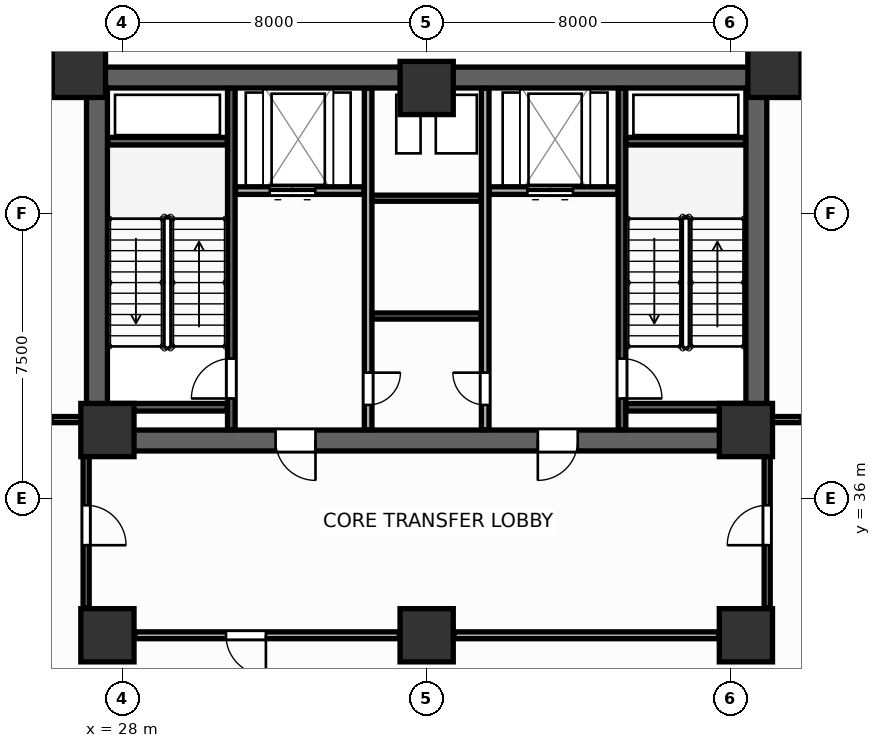
"""IFC4 building model, lengths in metres.
Left out: names, types, materials, properties, quantities, classifications, styles, units other than length and angle.
Written with IfcOpenShell. Run it as: python <this file> out.ifc"""

import sys

from ifc_helpers import new_model, si_unit, direction, frame, frame_2d, origin, origin_2d, place, context, subcontext, project, spatial, rectangle, extrude, source, transform, mapped, element, fill, save


model = new_model("IFC4")
c1 = context("Model", 3, precision=1e-05, world=origin(), true_north=direction((0.0, 1.0)))
c2 = subcontext(c1, "Body", "Model", "MODEL_VIEW")
j1 = project(units=[si_unit("LENGTHUNIT", "METRE"), si_unit("PLANEANGLEUNIT", "RADIAN")], contexts=[c1])
p1 = place(None, origin())
s1 = spatial("IfcSite", under=j1, at=p1, CompositionType="ELEMENT")
p2 = place(p1, origin())
s2 = spatial("IfcBuilding", under=s1, at=p2, CompositionType="ELEMENT")
p3 = place(p2, frame((0.0, 0.0, -4.5)))
s3 = spatial("IfcBuildingStorey", under=s2, at=p3, CompositionType="ELEMENT", Elevation=-4.5)
p4 = place(p3, frame((27.05, 47.075, 0.0), z_axis=(0.0, 0.0, 1.0), x_axis=(1.0, 0.0, 0.0)))
e1 = element("IfcWall", 1, at=p4, inside=s3, PredefinedType="SHEAR", context=c2, shape_type="SweptSolid", body=[
    extrude(rectangle(XDim=17.9, YDim=0.55, at=frame_2d((8.95, 0.0))), origin(), (0.0, 0.0, 1.0), 4.5),
])
p5 = place(p3, frame((27.05, 37.525, 0.0), z_axis=(0.0, 0.0, 1.0), x_axis=(1.0, 0.0, 0.0)))
e2 = element("IfcWall", 2, at=p5, inside=s3, PredefinedType="SHEAR", context=c2, shape_type="SweptSolid", body=[
    extrude(rectangle(XDim=17.9, YDim=0.55, at=frame_2d((8.95, 0.0))), origin(), (0.0, 0.0, 1.0), 4.5),
])
p6 = place(p5, frame((4.975, 0.0, 0.0)))
e3 = element("IfcOpeningElement", 3, at=p6, cuts=e2, PredefinedType="OPENING", context=c2, shape_type="SweptSolid", body=[
    extrude(rectangle(XDim=1.05, YDim=2.1, at=frame_2d((0.525, 1.05))), frame((0.0, 0.285, 0.0), z_axis=(0.0, -1.0, 0.0), x_axis=(1.0, 0.0, 0.0)), (0.0, 0.0, 1.0), 0.57),
])
p7 = place(p5, frame((11.875, 0.0, 0.0)))
e4 = element("IfcOpeningElement", 4, at=p7, cuts=e2, PredefinedType="OPENING", context=c2, shape_type="SweptSolid", body=[
    extrude(rectangle(XDim=1.05, YDim=2.1, at=frame_2d((0.525, 1.05))), frame((0.0, 0.285, 0.0), z_axis=(0.0, -1.0, 0.0), x_axis=(1.0, 0.0, 0.0)), (0.0, 0.0, 1.0), 0.57),
])
for number, where, z_axis, x_axis in (
    (5, (27.325, 37.8, 0.0), (0.0, 0.0, 1.0), (0.0, 1.0, 0.0)),
    (6, (44.675, 37.8, 0.0), (0.0, 0.0, 1.0), (0.0, 1.0, 0.0)),
):
    element("IfcWall", number, at=place(p3, frame(where, z_axis=z_axis, x_axis=x_axis)), inside=s3, PredefinedType="SHEAR", context=c2, shape_type="SweptSolid", body=[
        extrude(rectangle(XDim=9.0, YDim=0.55, at=frame_2d((4.5, 0.0))), origin(), (0.0, 0.0, 1.0), 4.5),
    ])
m1 = source(origin(), c2, "Body", "SweptSolid", [
    extrude(rectangle(XDim=1.4, YDim=1.4, at=origin_2d()), origin(), (0.0, 0.0, 1.0), 4.5),
])
for number, where, z_axis, x_axis in (
    (7, (26.85, 47.25, 0.0), (0.0, 0.0, 1.0), (1.0, 0.0, 0.0)),
    (8, (45.15, 47.25, 0.0), (0.0, 0.0, 1.0), (1.0, 0.0, 0.0)),
    (9, (27.6, 37.8, 0.0), (0.0, 0.0, 1.0), (1.0, 0.0, 0.0)),
    (10, (44.4, 37.8, 0.0), (0.0, 0.0, 1.0), (1.0, 0.0, 0.0)),
    (11, (27.6, 32.4, 0.0), (0.0, 0.0, 1.0), (1.0, 0.0, 0.0)),
    (12, (44.4, 32.4, 0.0), (0.0, 0.0, 1.0), (1.0, 0.0, 0.0)),
    (13, (36.0, 46.8, 0.0), (0.0, 0.0, 1.0), (1.0, 0.0, 0.0)),
    (14, (36.0, 32.4, 0.0), (0.0, 0.0, 1.0), (1.0, 0.0, 0.0)),
):
    element("IfcColumn", number, at=place(p3, frame(where, z_axis=z_axis, x_axis=x_axis)), inside=s3, PredefinedType="COLUMN", context=c2, shape_type="MappedRepresentation", body=[
        mapped(m1, transform((0.0, 0.0, 0.0), scale=1.0)),
    ])
p8 = place(p3, frame((30.86, 37.81, 0.0), z_axis=(0.0, 0.0, 1.0), x_axis=(0.0, 1.0, 0.0)))
e15 = element("IfcWall", 15, at=p8, inside=s3, PredefinedType="SHEAR", context=c2, shape_type="SweptSolid", body=[
    extrude(rectangle(XDim=8.98, YDim=0.2, at=frame_2d((4.49, 0.0))), origin(), (0.0, 0.0, 1.0), 4.5),
])
p9 = place(p8, frame((0.82, 0.0, 0.0)))
e16 = element("IfcOpeningElement", 16, at=p9, cuts=e15, PredefinedType="OPENING", context=c2, shape_type="SweptSolid", body=[
    extrude(rectangle(XDim=1.05, YDim=2.1, at=frame_2d((0.525, 1.05))), frame((0.0, 0.11, 0.0), z_axis=(0.0, -1.0, 0.0), x_axis=(1.0, 0.0, 0.0)), (0.0, 0.0, 1.0), 0.22),
])
for number, where, z_axis, x_axis in (
    (17, (27.61, 45.4, 0.0), (0.0, 0.0, 1.0), (1.0, 0.0, 0.0)),
    (18, (27.61, 38.4, 0.0), (0.0, 0.0, 1.0), (1.0, 0.0, 0.0)),
):
    element("IfcWall", number, at=place(p3, frame(where, z_axis=z_axis, x_axis=x_axis)), inside=s3, PredefinedType="SHEAR", context=c2, shape_type="SweptSolid", body=[
        extrude(rectangle(XDim=3.14, YDim=0.2, at=frame_2d((1.57, 0.0))), origin(), (0.0, 0.0, 1.0), 4.5),
    ])
p10 = place(p3, frame((41.14, 37.81, 0.0), z_axis=(0.0, 0.0, 1.0), x_axis=(0.0, 1.0, 0.0)))
e19 = element("IfcWall", 19, at=p10, inside=s3, PredefinedType="SHEAR", context=c2, shape_type="SweptSolid", body=[
    extrude(rectangle(XDim=8.98, YDim=0.2, at=frame_2d((4.49, 0.0))), origin(), (0.0, 0.0, 1.0), 4.5),
])
p11 = place(p10, frame((0.82, 0.0, 0.0)))
e20 = element("IfcOpeningElement", 20, at=p11, cuts=e19, PredefinedType="OPENING", context=c2, shape_type="SweptSolid", body=[
    extrude(rectangle(XDim=1.05, YDim=2.1, at=frame_2d((0.525, 1.05))), frame((0.0, 0.11, 0.0), z_axis=(0.0, -1.0, 0.0), x_axis=(1.0, 0.0, 0.0)), (0.0, 0.0, 1.0), 0.22),
])
for number, where, z_axis, x_axis in (
    (21, (41.25, 45.4, 0.0), (0.0, 0.0, 1.0), (1.0, 0.0, 0.0)),
    (22, (41.25, 38.4, 0.0), (0.0, 0.0, 1.0), (1.0, 0.0, 0.0)),
):
    element("IfcWall", number, at=place(p3, frame(where, z_axis=z_axis, x_axis=x_axis)), inside=s3, PredefinedType="SHEAR", context=c2, shape_type="SweptSolid", body=[
        extrude(rectangle(XDim=3.14, YDim=0.2, at=frame_2d((1.57, 0.0))), origin(), (0.0, 0.0, 1.0), 4.5),
    ])
p12 = place(p3, frame((30.97, 44.1, 0.0), z_axis=(0.0, 0.0, 1.0), x_axis=(1.0, 0.0, 0.0)))
e23 = element("IfcWall", 23, at=p12, inside=s3, PredefinedType="PARTITIONING", context=c2, shape_type="SweptSolid", body=[
    extrude(rectangle(XDim=3.38, YDim=0.2, at=frame_2d((1.69, 0.0))), origin(), (0.0, 0.0, 1.0), 4.22),
])
p13 = place(p12, frame((0.9, 0.0, 0.0)))
e24 = element("IfcOpeningElement", 24, at=p13, cuts=e23, PredefinedType="OPENING", context=c2, shape_type="SweptSolid", body=[
    extrude(rectangle(XDim=1.2, YDim=2.1, at=frame_2d((0.6, 1.05))), frame((0.0, 0.11, 0.0), z_axis=(0.0, -1.0, 0.0), x_axis=(1.0, 0.0, 0.0)), (0.0, 0.0, 1.0), 0.22),
])
p14 = place(p3, frame((37.65, 44.1, 0.0), z_axis=(0.0, 0.0, 1.0), x_axis=(1.0, 0.0, 0.0)))
e25 = element("IfcWall", 25, at=p14, inside=s3, PredefinedType="PARTITIONING", context=c2, shape_type="SweptSolid", body=[
    extrude(rectangle(XDim=3.38, YDim=0.2, at=frame_2d((1.69, 0.0))), origin(), (0.0, 0.0, 1.0), 4.22),
])
p15 = place(p14, frame((1.0, 0.0, 0.0)))
e26 = element("IfcOpeningElement", 26, at=p15, cuts=e25, PredefinedType="OPENING", context=c2, shape_type="SweptSolid", body=[
    extrude(rectangle(XDim=1.2, YDim=2.1, at=frame_2d((0.6, 1.05))), frame((0.0, 0.11, 0.0), z_axis=(0.0, -1.0, 0.0), x_axis=(1.0, 0.0, 0.0)), (0.0, 0.0, 1.0), 0.22),
])
p16 = place(p3, frame((34.46, 37.81, 0.0), z_axis=(0.0, 0.0, 1.0), x_axis=(0.0, 1.0, 0.0)))
e27 = element("IfcWall", 27, at=p16, inside=s3, PredefinedType="PARTITIONING", context=c2, shape_type="SweptSolid", body=[
    extrude(rectangle(XDim=8.98, YDim=0.2, at=frame_2d((4.49, 0.0))), origin(), (0.0, 0.0, 1.0), 4.22),
])
p17 = place(p16, frame((0.65, 0.0, 0.0)))
e28 = element("IfcOpeningElement", 28, at=p17, cuts=e27, PredefinedType="OPENING", context=c2, shape_type="SweptSolid", body=[
    extrude(rectangle(XDim=0.85, YDim=2.05, at=frame_2d((0.425, 1.025))), frame((0.0, 0.11, 0.0), z_axis=(0.0, -1.0, 0.0), x_axis=(1.0, 0.0, 0.0)), (0.0, 0.0, 1.0), 0.22),
])
p18 = place(p3, frame((37.54, 37.81, 0.0), z_axis=(0.0, 0.0, 1.0), x_axis=(0.0, 1.0, 0.0)))
e29 = element("IfcWall", 29, at=p18, inside=s3, PredefinedType="PARTITIONING", context=c2, shape_type="SweptSolid", body=[
    extrude(rectangle(XDim=8.98, YDim=0.2, at=frame_2d((4.49, 0.0))), origin(), (0.0, 0.0, 1.0), 4.22),
])
p19 = place(p18, frame((0.65, 0.0, 0.0)))
e30 = element("IfcOpeningElement", 30, at=p19, cuts=e29, PredefinedType="OPENING", context=c2, shape_type="SweptSolid", body=[
    extrude(rectangle(XDim=0.85, YDim=2.05, at=frame_2d((0.425, 1.025))), frame((0.0, 0.11, 0.0), z_axis=(0.0, -1.0, 0.0), x_axis=(1.0, 0.0, 0.0)), (0.0, 0.0, 1.0), 0.22),
])
for number, where, z_axis, x_axis in (
    (31, (34.57, 40.8, 0.0), (0.0, 0.0, 1.0), (1.0, 0.0, 0.0)),
    (32, (34.57, 43.9, 0.0), (0.0, 0.0, 1.0), (1.0, 0.0, 0.0)),
):
    element("IfcWall", number, at=place(p3, frame(where, z_axis=z_axis, x_axis=x_axis)), inside=s3, PredefinedType="PARTITIONING", context=c2, shape_type="SweptSolid", body=[
        extrude(rectangle(XDim=2.86, YDim=0.16, at=frame_2d((1.43, 0.0))), origin(), (0.0, 0.0, 1.0), 4.22),
    ])
p20 = place(p3, frame((28.32, 32.4, 0.0), z_axis=(0.0, 0.0, 1.0), x_axis=(1.0, 0.0, 0.0)))
e33 = element("IfcWall", 33, at=p20, inside=s3, PredefinedType="PARTITIONING", context=c2, shape_type="SweptSolid", body=[
    extrude(rectangle(XDim=6.96, YDim=0.18, at=frame_2d((3.48, 0.0))), origin(), (0.0, 0.0, 1.0), 3.52),
])
p21 = place(p20, frame((2.4, 0.0, 0.0)))
e34 = element("IfcOpeningElement", 34, at=p21, cuts=e33, PredefinedType="OPENING", context=c2, shape_type="SweptSolid", body=[
    extrude(rectangle(XDim=1.05, YDim=2.1, at=frame_2d((0.525, 1.05))), frame((0.0, 0.1, 0.0), z_axis=(0.0, -1.0, 0.0), x_axis=(1.0, 0.0, 0.0)), (0.0, 0.0, 1.0), 0.2),
])
p22 = place(p3, frame((36.72, 32.4, 0.0), z_axis=(0.0, 0.0, 1.0), x_axis=(1.0, 0.0, 0.0)))
e35 = element("IfcWall", 35, at=p22, inside=s3, PredefinedType="PARTITIONING", context=c2, shape_type="SweptSolid", body=[
    extrude(rectangle(XDim=6.96, YDim=0.18, at=frame_2d((3.48, 0.0))), origin(), (0.0, 0.0, 1.0), 3.52),
])
p23 = place(p3, frame((27.04, 33.12, 0.0), z_axis=(0.0, 0.0, 1.0), x_axis=(0.0, 1.0, 0.0)))
e36 = element("IfcWall", 36, at=p23, inside=s3, PredefinedType="PARTITIONING", context=c2, shape_type="SweptSolid", body=[
    extrude(rectangle(XDim=4.38, YDim=0.16, at=frame_2d((2.19, 0.0))), origin(), (0.0, 0.0, 1.0), 4.22),
])
p24 = place(p23, frame((1.65, 0.0, 0.0)))
e37 = element("IfcOpeningElement", 37, at=p24, cuts=e36, PredefinedType="OPENING", context=c2, shape_type="SweptSolid", body=[
    extrude(rectangle(XDim=1.05, YDim=2.1, at=frame_2d((0.525, 1.05))), frame((0.0, 0.09, 0.0), z_axis=(0.0, -1.0, 0.0), x_axis=(1.0, 0.0, 0.0)), (0.0, 0.0, 1.0), 0.18),
])
p25 = place(p3, frame((44.96, 33.12, 0.0), z_axis=(0.0, 0.0, 1.0), x_axis=(0.0, 1.0, 0.0)))
e38 = element("IfcWall", 38, at=p25, inside=s3, PredefinedType="PARTITIONING", context=c2, shape_type="SweptSolid", body=[
    extrude(rectangle(XDim=4.38, YDim=0.16, at=frame_2d((2.19, 0.0))), origin(), (0.0, 0.0, 1.0), 4.22),
])
p26 = place(p25, frame((1.65, 0.0, 0.0)))
e39 = element("IfcOpeningElement", 39, at=p26, cuts=e38, PredefinedType="OPENING", context=c2, shape_type="SweptSolid", body=[
    extrude(rectangle(XDim=1.05, YDim=2.1, at=frame_2d((0.525, 1.05))), frame((0.0, 0.09, 0.0), z_axis=(0.0, -1.0, 0.0), x_axis=(1.0, 0.0, 0.0)), (0.0, 0.0, 1.0), 0.18),
])
for number, where, z_axis, x_axis in (
    (40, (25.107, 38.075, 0.0), (0.0, 0.0, 1.0), (1.0, 0.0, 0.0)),
    (41, (44.952, 38.075, 0.0), (0.0, 0.0, 1.0), (1.0, 0.0, 0.0)),
):
    element("IfcWall", number, at=place(p3, frame(where, z_axis=z_axis, x_axis=x_axis)), inside=s3, PredefinedType="PARTITIONING", context=c2, shape_type="SweptSolid", body=[
        extrude(rectangle(XDim=1.941, YDim=0.16, at=frame_2d((0.971, 0.0))), origin(), (0.0, 0.0, 1.0), 4.22),
    ])
p27 = place(p9, origin())
e42 = element("IfcDoor", 42, at=p27, inside=s3, OperationType="SINGLE_SWING_LEFT", PredefinedType="DOOR", context=c2, shape_type="SweptSolid", body=[
    extrude(rectangle(XDim=1.05, YDim=2.1, at=frame_2d((0.525, 1.05))), frame((0.0, 0.025, 0.0), z_axis=(0.0, -1.0, 0.0), x_axis=(1.0, 0.0, 0.0)), (0.0, 0.0, 1.0), 0.05),
])
fill(e16, e42)
p28 = place(p11, frame((1.05, 0.0, 0.0), z_axis=(0.0, 0.0, 1.0), x_axis=(-1.0, 0.0, 0.0)))
e43 = element("IfcDoor", 43, at=p28, inside=s3, OperationType="SINGLE_SWING_RIGHT", PredefinedType="DOOR", context=c2, shape_type="SweptSolid", body=[
    extrude(rectangle(XDim=1.05, YDim=2.1, at=frame_2d((0.525, 1.05))), frame((0.0, 0.025, 0.0), z_axis=(0.0, -1.0, 0.0), x_axis=(1.0, 0.0, 0.0)), (0.0, 0.0, 1.0), 0.05),
])
fill(e20, e43)
p29 = place(p13, origin())
e44 = element("IfcDoor", 44, at=p29, inside=s3, OperationType="DOUBLE_DOOR_SLIDING", PredefinedType="DOOR", context=c2, shape_type="SweptSolid", body=[
    extrude(rectangle(XDim=1.2, YDim=2.1, at=frame_2d((0.6, 1.05))), frame((0.0, 0.025, 0.0), z_axis=(0.0, -1.0, 0.0), x_axis=(1.0, 0.0, 0.0)), (0.0, 0.0, 1.0), 0.05),
])
fill(e24, e44)
p30 = place(p15, origin())
e45 = element("IfcDoor", 45, at=p30, inside=s3, OperationType="DOUBLE_DOOR_SLIDING", PredefinedType="DOOR", context=c2, shape_type="SweptSolid", body=[
    extrude(rectangle(XDim=1.2, YDim=2.1, at=frame_2d((0.6, 1.05))), frame((0.0, 0.025, 0.0), z_axis=(0.0, -1.0, 0.0), x_axis=(1.0, 0.0, 0.0)), (0.0, 0.0, 1.0), 0.05),
])
fill(e26, e45)
p31 = place(p17, frame((0.85, 0.0, 0.0), z_axis=(0.0, 0.0, 1.0), x_axis=(-1.0, 0.0, 0.0)))
e46 = element("IfcDoor", 46, at=p31, inside=s3, OperationType="SINGLE_SWING_LEFT", PredefinedType="DOOR", context=c2, shape_type="SweptSolid", body=[
    extrude(rectangle(XDim=0.85, YDim=2.05, at=frame_2d((0.425, 1.025))), frame((0.0, 0.025, 0.0), z_axis=(0.0, -1.0, 0.0), x_axis=(1.0, 0.0, 0.0)), (0.0, 0.0, 1.0), 0.05),
])
fill(e28, e46)
p32 = place(p19, origin())
e47 = element("IfcDoor", 47, at=p32, inside=s3, OperationType="SINGLE_SWING_RIGHT", PredefinedType="DOOR", context=c2, shape_type="SweptSolid", body=[
    extrude(rectangle(XDim=0.85, YDim=2.05, at=frame_2d((0.425, 1.025))), frame((0.0, 0.025, 0.0), z_axis=(0.0, -1.0, 0.0), x_axis=(1.0, 0.0, 0.0)), (0.0, 0.0, 1.0), 0.05),
])
fill(e30, e47)
p33 = place(p21, frame((1.05, 0.0, 0.0), z_axis=(0.0, 0.0, 1.0), x_axis=(-1.0, 0.0, 0.0)))
e48 = element("IfcDoor", 48, at=p33, inside=s3, OperationType="SINGLE_SWING_LEFT", PredefinedType="DOOR", context=c2, shape_type="SweptSolid", body=[
    extrude(rectangle(XDim=1.05, YDim=2.1, at=frame_2d((0.525, 1.05))), frame((0.0, 0.025, 0.0), z_axis=(0.0, -1.0, 0.0), x_axis=(1.0, 0.0, 0.0)), (0.0, 0.0, 1.0), 0.05),
])
fill(e34, e48)
p34 = place(p24, frame((1.05, 0.0, 0.0), z_axis=(0.0, 0.0, 1.0), x_axis=(-1.0, 0.0, 0.0)))
e49 = element("IfcDoor", 49, at=p34, inside=s3, OperationType="SINGLE_SWING_RIGHT", PredefinedType="DOOR", context=c2, shape_type="SweptSolid", body=[
    extrude(rectangle(XDim=1.05, YDim=2.1, at=frame_2d((0.525, 1.05))), frame((0.0, 0.025, 0.0), z_axis=(0.0, -1.0, 0.0), x_axis=(1.0, 0.0, 0.0)), (0.0, 0.0, 1.0), 0.05),
])
fill(e37, e49)
p35 = place(p26, origin())
e50 = element("IfcDoor", 50, at=p35, inside=s3, OperationType="SINGLE_SWING_LEFT", PredefinedType="DOOR", context=c2, shape_type="SweptSolid", body=[
    extrude(rectangle(XDim=1.05, YDim=2.1, at=frame_2d((0.525, 1.05))), frame((0.0, 0.025, 0.0), z_axis=(0.0, -1.0, 0.0), x_axis=(1.0, 0.0, 0.0)), (0.0, 0.0, 1.0), 0.05),
])
fill(e39, e50)
p36 = place(p6, frame((1.05, 0.0, 0.0), z_axis=(0.0, 0.0, 1.0), x_axis=(-1.0, 0.0, 0.0)))
e51 = element("IfcDoor", 51, at=p36, inside=s3, OperationType="SINGLE_SWING_LEFT", PredefinedType="DOOR", context=c2, shape_type="SweptSolid", body=[
    extrude(rectangle(XDim=1.05, YDim=2.1, at=frame_2d((0.525, 1.05))), frame((0.0, 0.025, 0.0), z_axis=(0.0, -1.0, 0.0), x_axis=(1.0, 0.0, 0.0)), (0.0, 0.0, 1.0), 0.05),
])
fill(e3, e51)
p37 = place(p7, frame((1.05, 0.0, 0.0), z_axis=(0.0, 0.0, 1.0), x_axis=(-1.0, 0.0, 0.0)))
e52 = element("IfcDoor", 52, at=p37, inside=s3, OperationType="SINGLE_SWING_RIGHT", PredefinedType="DOOR", context=c2, shape_type="SweptSolid", body=[
    extrude(rectangle(XDim=1.05, YDim=2.1, at=frame_2d((0.525, 1.05))), frame((0.0, 0.025, 0.0), z_axis=(0.0, -1.0, 0.0), x_axis=(1.0, 0.0, 0.0)), (0.0, 0.0, 1.0), 0.05),
])
fill(e4, e52)
save(model, sys.argv[1])
